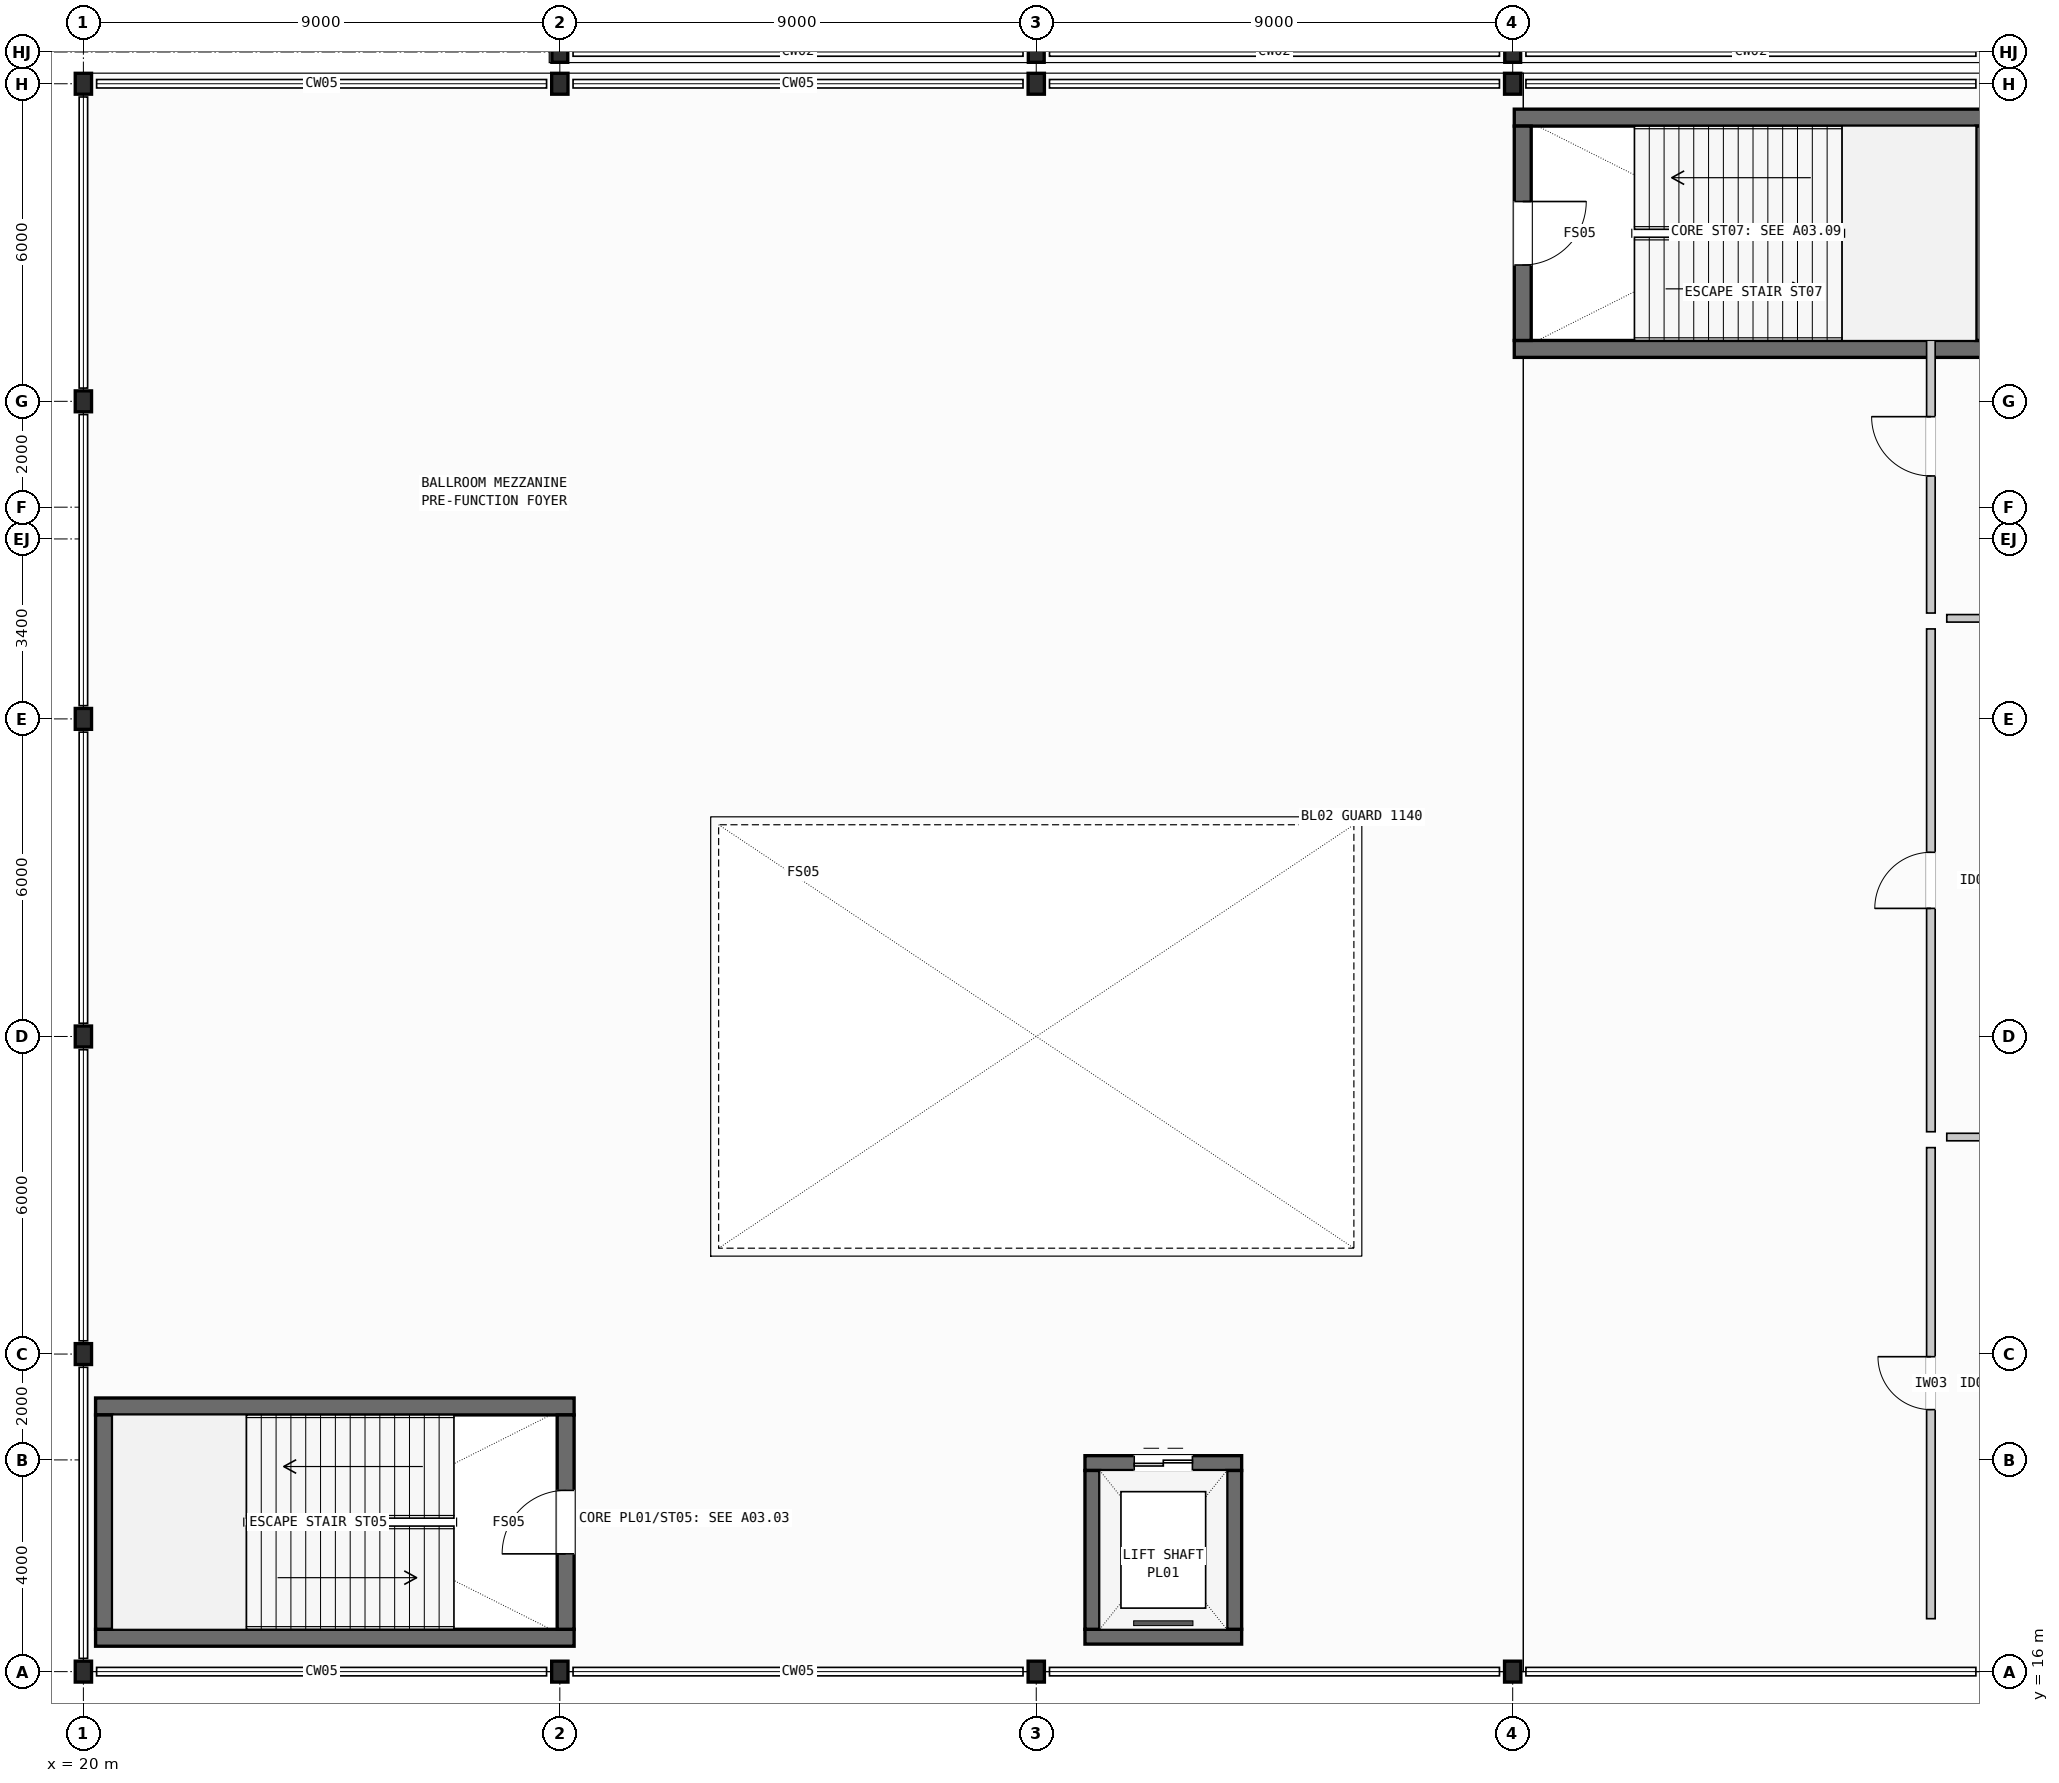
"""IFC4 building model, lengths in metres.
Left out: names, types, materials, properties, quantities, classifications, styles, units other than length and angle.
Written with IfcOpenShell. Run it as: python <this file> out.ifc"""

import sys

from ifc_helpers import new_model, si_unit, direction, frame, frame_2d, origin, origin_2d, place, context, subcontext, project, spatial, rectangle, i_section, extrude, element, fill, save


model = new_model("IFC4")
c1 = context("Model", 3, precision=1e-05, world=origin(), true_north=direction((0.0, 1.0)))
c2 = subcontext(c1, "Body", "Model", "MODEL_VIEW")
j1 = project(units=[si_unit("LENGTHUNIT", "METRE"), si_unit("PLANEANGLEUNIT", "RADIAN")], contexts=[c1])
p1 = place(None, origin())
s1 = spatial("IfcSite", under=j1, at=p1, CompositionType="ELEMENT")
p2 = place(p1, origin())
s2 = spatial("IfcBuilding", under=s1, at=p2, CompositionType="ELEMENT")
p3 = place(p2, frame((0.0, 0.0, 6.0)))
s3 = spatial("IfcBuildingStorey", under=s2, at=p3, CompositionType="ELEMENT", Elevation=6.0)
for number, where, z_axis, x_axis in (
    (1, (20.0, 16.0, 0.0), (0.0, 0.0, 1.0), (1.0, 0.0, 0.0)),
    (2, (20.0, 22.0, 0.0), (0.0, 0.0, 1.0), (1.0, 0.0, 0.0)),
    (3, (20.0, 28.0, 0.0), (0.0, 0.0, 1.0), (1.0, 0.0, 0.0)),
    (4, (20.0, 34.0, 0.0), (0.0, 0.0, 1.0), (1.0, 0.0, 0.0)),
    (5, (20.0, 40.0, 0.0), (0.0, 0.0, 1.0), (1.0, 0.0, 0.0)),
    (6, (20.0, 46.0, 0.0), (0.0, 0.0, 1.0), (1.0, 0.0, 0.0)),
    (7, (29.0, 16.0, 0.0), (0.0, 0.0, 1.0), (1.0, 0.0, 0.0)),
    (8, (29.0, 46.0, 0.0), (0.0, 0.0, 1.0), (1.0, 0.0, 0.0)),
):
    element("IfcColumn", number, at=place(p3, frame(where, z_axis=z_axis, x_axis=x_axis)), inside=s3, PredefinedType="COLUMN", context=c2, shape_type="SweptSolid", body=[
        extrude(i_section(OverallWidth=0.308, OverallDepth=0.395, WebThickness=0.021, FlangeThickness=0.04, FilletRadius=0.027, at=origin_2d()), origin(), (0.0, 0.0, 1.0), 5.4),
    ])
p4 = place(p3, frame((29.0, 46.6, 0.0), z_axis=(0.0, 0.0, 1.0), x_axis=(1.0, 0.0, 0.0)))
e9 = element("IfcColumn", 9, at=p4, inside=s3, PredefinedType="COLUMN", context=c2, shape_type="SweptSolid", body=[
    extrude(i_section(OverallWidth=0.3, OverallDepth=0.39, WebThickness=0.011, FlangeThickness=0.019, FilletRadius=0.027, at=origin_2d()), origin(), (0.0, 0.0, 1.0), 5.4),
])
for number, where, z_axis, x_axis in (
    (10, (38.0, 16.0, 0.0), (0.0, 0.0, 1.0), (1.0, 0.0, 0.0)),
    (11, (38.0, 46.0, 0.0), (0.0, 0.0, 1.0), (1.0, 0.0, 0.0)),
):
    element("IfcColumn", number, at=place(p3, frame(where, z_axis=z_axis, x_axis=x_axis)), inside=s3, PredefinedType="COLUMN", context=c2, shape_type="SweptSolid", body=[
        extrude(i_section(OverallWidth=0.308, OverallDepth=0.395, WebThickness=0.021, FlangeThickness=0.04, FilletRadius=0.027, at=origin_2d()), origin(), (0.0, 0.0, 1.0), 5.4),
    ])
p5 = place(p3, frame((38.0, 46.6, 0.0), z_axis=(0.0, 0.0, 1.0), x_axis=(1.0, 0.0, 0.0)))
e12 = element("IfcColumn", 12, at=p5, inside=s3, PredefinedType="COLUMN", context=c2, shape_type="SweptSolid", body=[
    extrude(i_section(OverallWidth=0.3, OverallDepth=0.39, WebThickness=0.011, FlangeThickness=0.019, FilletRadius=0.027, at=origin_2d()), origin(), (0.0, 0.0, 1.0), 5.4),
])
for number, where, z_axis, x_axis in (
    (13, (47.0, 16.0, 0.0), (0.0, 0.0, 1.0), (1.0, 0.0, 0.0)),
    (14, (47.0, 46.0, 0.0), (0.0, 0.0, 1.0), (1.0, 0.0, 0.0)),
):
    element("IfcColumn", number, at=place(p3, frame(where, z_axis=z_axis, x_axis=x_axis)), inside=s3, PredefinedType="COLUMN", context=c2, shape_type="SweptSolid", body=[
        extrude(i_section(OverallWidth=0.308, OverallDepth=0.395, WebThickness=0.021, FlangeThickness=0.04, FilletRadius=0.027, at=origin_2d()), origin(), (0.0, 0.0, 1.0), 5.4),
    ])
p6 = place(p3, frame((47.0, 46.6, 0.0), z_axis=(0.0, 0.0, 1.0), x_axis=(1.0, 0.0, 0.0)))
e15 = element("IfcColumn", 15, at=p6, inside=s3, PredefinedType="COLUMN", context=c2, shape_type="SweptSolid", body=[
    extrude(i_section(OverallWidth=0.3, OverallDepth=0.39, WebThickness=0.011, FlangeThickness=0.019, FilletRadius=0.027, at=origin_2d()), origin(), (0.0, 0.0, 1.0), 5.4),
])
for number, where, z_axis, x_axis in (
    (16, (20.23, 16.64, 0.0), (0.0, 0.0, 1.0), (1.0, 0.0, 0.0)),
    (17, (20.23, 21.01, 0.0), (0.0, 0.0, 1.0), (1.0, 0.0, 0.0)),
):
    element("IfcWall", number, at=place(p3, frame(where, z_axis=z_axis, x_axis=x_axis)), inside=s3, PredefinedType="SHEAR", context=c2, shape_type="SweptSolid", body=[
        extrude(rectangle(XDim=9.04, YDim=0.32, at=frame_2d((4.52, 0.0))), origin(), (0.0, 0.0, 1.0), 5.4),
    ])
p7 = place(p3, frame((20.39, 16.8, 0.0), z_axis=(0.0, 0.0, 1.0), x_axis=(0.0, 1.0, 0.0)))
e18 = element("IfcWall", 18, at=p7, inside=s3, PredefinedType="SHEAR", context=c2, shape_type="SweptSolid", body=[
    extrude(rectangle(XDim=4.05, YDim=0.32, at=frame_2d((2.025, 0.0))), origin(), (0.0, 0.0, 1.0), 5.4),
])
p8 = place(p3, frame((29.11, 16.8, 0.0), z_axis=(0.0, 0.0, 1.0), x_axis=(0.0, 1.0, 0.0)))
e19 = element("IfcWall", 19, at=p8, inside=s3, PredefinedType="SHEAR", context=c2, shape_type="SweptSolid", body=[
    extrude(rectangle(XDim=4.05, YDim=0.32, at=frame_2d((2.025, 0.0))), origin(), (0.0, 0.0, 1.0), 5.4),
])
p9 = place(p8, frame((1.425, 0.0, 0.0)))
e20 = element("IfcOpeningElement", 20, at=p9, cuts=e19, PredefinedType="OPENING", context=c2, shape_type="SweptSolid", body=[
    extrude(rectangle(XDim=1.2, YDim=2.2, at=frame_2d((0.6, 1.1))), frame((0.0, 0.17, 0.0), z_axis=(0.0, -1.0, 0.0), x_axis=(1.0, 0.0, 0.0)), (0.0, 0.0, 1.0), 0.34),
])
for number, where, z_axis, x_axis in (
    (21, (47.03, 40.99, 0.0), (0.0, 0.0, 1.0), (1.0, 0.0, 0.0)),
    (22, (47.03, 45.36, 0.0), (0.0, 0.0, 1.0), (1.0, 0.0, 0.0)),
):
    element("IfcWall", number, at=place(p3, frame(where, z_axis=z_axis, x_axis=x_axis)), inside=s3, PredefinedType="SHEAR", context=c2, shape_type="SweptSolid", body=[
        extrude(rectangle(XDim=9.04, YDim=0.32, at=frame_2d((4.52, 0.0))), origin(), (0.0, 0.0, 1.0), 5.4),
    ])
p10 = place(p3, frame((47.19, 41.15, 0.0), z_axis=(0.0, 0.0, 1.0), x_axis=(0.0, 1.0, 0.0)))
e23 = element("IfcWall", 23, at=p10, inside=s3, PredefinedType="SHEAR", context=c2, shape_type="SweptSolid", body=[
    extrude(rectangle(XDim=4.05, YDim=0.32, at=frame_2d((2.025, 0.0))), origin(), (0.0, 0.0, 1.0), 5.4),
])
p11 = place(p10, frame((1.425, 0.0, 0.0)))
e24 = element("IfcOpeningElement", 24, at=p11, cuts=e23, PredefinedType="OPENING", context=c2, shape_type="SweptSolid", body=[
    extrude(rectangle(XDim=1.2, YDim=2.2, at=frame_2d((0.6, 1.1))), frame((0.0, 0.17, 0.0), z_axis=(0.0, -1.0, 0.0), x_axis=(1.0, 0.0, 0.0)), (0.0, 0.0, 1.0), 0.34),
])
p12 = place(p3, frame((55.91, 41.15, 0.0), z_axis=(0.0, 0.0, 1.0), x_axis=(0.0, 1.0, 0.0)))
e25 = element("IfcWall", 25, at=p12, inside=s3, PredefinedType="SHEAR", context=c2, shape_type="SweptSolid", body=[
    extrude(rectangle(XDim=4.05, YDim=0.32, at=frame_2d((2.025, 0.0))), origin(), (0.0, 0.0, 1.0), 5.4),
])
p13 = place(p3, frame((38.92, 16.66, 0.0), z_axis=(0.0, 0.0, 1.0), x_axis=(1.0, 0.0, 0.0)))
e26 = element("IfcWall", 26, at=p13, inside=s3, PredefinedType="SHEAR", context=c2, shape_type="SweptSolid", body=[
    extrude(rectangle(XDim=2.96, YDim=0.28, at=frame_2d((1.48, 0.0))), origin(), (0.0, 0.0, 1.0), 5.4),
])
p14 = place(p3, frame((38.92, 19.94, 0.0), z_axis=(0.0, 0.0, 1.0), x_axis=(1.0, 0.0, 0.0)))
e27 = element("IfcWall", 27, at=p14, inside=s3, PredefinedType="SHEAR", context=c2, shape_type="SweptSolid", body=[
    extrude(rectangle(XDim=2.96, YDim=0.28, at=frame_2d((1.48, 0.0))), origin(), (0.0, 0.0, 1.0), 5.4),
])
p15 = place(p14, frame((0.93, 0.0, 0.0)))
e28 = element("IfcOpeningElement", 28, at=p15, cuts=e27, PredefinedType="OPENING", context=c2, shape_type="SweptSolid", body=[
    extrude(rectangle(XDim=1.1, YDim=2.15, at=frame_2d((0.55, 1.075))), frame((0.0, 0.15, 0.0), z_axis=(0.0, -1.0, 0.0), x_axis=(1.0, 0.0, 0.0)), (0.0, 0.0, 1.0), 0.3),
])
for number, where, z_axis, x_axis in (
    (29, (39.06, 16.8, 0.0), (0.0, 0.0, 1.0), (0.0, 1.0, 0.0)),
    (30, (41.74, 16.8, 0.0), (0.0, 0.0, 1.0), (0.0, 1.0, 0.0)),
):
    element("IfcWall", number, at=place(p3, frame(where, z_axis=z_axis, x_axis=x_axis)), inside=s3, PredefinedType="SHEAR", context=c2, shape_type="SweptSolid", body=[
        extrude(rectangle(XDim=3.0, YDim=0.28, at=frame_2d((1.5, 0.0))), origin(), (0.0, 0.0, 1.0), 5.4),
    ])
p16 = place(p3, frame((54.9, 17.0, 0.0), z_axis=(0.0, 0.0, 1.0), x_axis=(0.0, 1.0, 0.0)))
e31 = element("IfcWall", 31, at=p16, inside=s3, PredefinedType="PARTITIONING", context=c2, shape_type="SweptSolid", body=[
    extrude(rectangle(XDim=8.9, YDim=0.162, at=frame_2d((4.45, 0.0))), origin(), (0.0, 0.0, 1.0), 4.4),
])
p17 = place(p16, frame((3.95, 0.0, 0.0)))
e32 = element("IfcOpeningElement", 32, at=p17, cuts=e31, PredefinedType="OPENING", context=c2, shape_type="SweptSolid", body=[
    extrude(rectangle(XDim=1.0, YDim=2.15, at=frame_2d((0.5, 1.075))), frame((0.0, 0.091, 0.0), z_axis=(0.0, -1.0, 0.0), x_axis=(1.0, 0.0, 0.0)), (0.0, 0.0, 1.0), 0.182),
])
p18 = place(p3, frame((54.9, 26.2, 0.0), z_axis=(0.0, 0.0, 1.0), x_axis=(0.0, 1.0, 0.0)))
e33 = element("IfcWall", 33, at=p18, inside=s3, PredefinedType="PARTITIONING", context=c2, shape_type="SweptSolid", body=[
    extrude(rectangle(XDim=9.5, YDim=0.162, at=frame_2d((4.75, 0.0))), origin(), (0.0, 0.0, 1.0), 4.4),
])
p19 = place(p18, frame((4.22, 0.0, 0.0)))
e34 = element("IfcOpeningElement", 34, at=p19, cuts=e33, PredefinedType="OPENING", context=c2, shape_type="SweptSolid", body=[
    extrude(rectangle(XDim=1.06, YDim=2.18, at=frame_2d((0.53, 1.09))), frame((0.0, 0.091, 0.0), z_axis=(0.0, -1.0, 0.0), x_axis=(1.0, 0.0, 0.0)), (0.0, 0.0, 1.0), 0.182),
])
p20 = place(p3, frame((54.9, 36.0, 0.0), z_axis=(0.0, 0.0, 1.0), x_axis=(0.0, 1.0, 0.0)))
e35 = element("IfcWall", 35, at=p20, inside=s3, PredefinedType="PARTITIONING", context=c2, shape_type="SweptSolid", body=[
    extrude(rectangle(XDim=8.8, YDim=0.162, at=frame_2d((4.4, 0.0))), origin(), (0.0, 0.0, 1.0), 4.4),
])
p21 = place(p20, frame((2.59, 0.0, 0.0)))
e36 = element("IfcOpeningElement", 36, at=p21, cuts=e35, PredefinedType="OPENING", context=c2, shape_type="SweptSolid", body=[
    extrude(rectangle(XDim=1.12, YDim=2.22, at=frame_2d((0.56, 1.11))), frame((0.0, 0.091, 0.0), z_axis=(0.0, -1.0, 0.0), x_axis=(1.0, 0.0, 0.0)), (0.0, 0.0, 1.0), 0.182),
])
for number, where, z_axis, x_axis in (
    (37, (55.2, 26.1, 0.0), (0.0, 0.0, 1.0), (1.0, 0.0, 0.0)),
    (38, (55.2, 35.9, 0.0), (0.0, 0.0, 1.0), (1.0, 0.0, 0.0)),
):
    element("IfcWall", number, at=place(p3, frame(where, z_axis=z_axis, x_axis=x_axis)), inside=s3, PredefinedType="MOVABLE", context=c2, shape_type="SweptSolid", body=[
        extrude(rectangle(XDim=27.0, YDim=0.142, at=frame_2d((13.5, 0.0))), origin(), (0.0, 0.0, 1.0), 2.65),
    ])
p22 = place(p9, origin())
e39 = element("IfcDoor", 39, at=p22, inside=s3, OperationType="SINGLE_SWING_LEFT", PredefinedType="DOOR", context=c2, shape_type="SweptSolid", body=[
    extrude(rectangle(XDim=1.2, YDim=2.2, at=frame_2d((0.6, 1.1))), frame((0.0, 0.025, 0.0), z_axis=(0.0, -1.0, 0.0), x_axis=(1.0, 0.0, 0.0)), (0.0, 0.0, 1.0), 0.05),
])
fill(e20, e39)
p23 = place(p11, frame((1.2, 0.0, 0.0), z_axis=(0.0, 0.0, 1.0), x_axis=(-1.0, 0.0, 0.0)))
e40 = element("IfcDoor", 40, at=p23, inside=s3, OperationType="SINGLE_SWING_LEFT", PredefinedType="DOOR", context=c2, shape_type="SweptSolid", body=[
    extrude(rectangle(XDim=1.2, YDim=2.2, at=frame_2d((0.6, 1.1))), frame((0.0, 0.025, 0.0), z_axis=(0.0, -1.0, 0.0), x_axis=(1.0, 0.0, 0.0)), (0.0, 0.0, 1.0), 0.05),
])
fill(e24, e40)
p24 = place(p15, origin())
e41 = element("IfcDoor", 41, at=p24, inside=s3, OperationType="DOUBLE_DOOR_SLIDING", PredefinedType="DOOR", context=c2, shape_type="SweptSolid", body=[
    extrude(rectangle(XDim=1.1, YDim=2.15, at=frame_2d((0.55, 1.075))), frame((0.0, 0.025, 0.0), z_axis=(0.0, -1.0, 0.0), x_axis=(1.0, 0.0, 0.0)), (0.0, 0.0, 1.0), 0.05),
])
fill(e28, e41)
p25 = place(p17, origin())
e42 = element("IfcDoor", 42, at=p25, inside=s3, OperationType="SINGLE_SWING_RIGHT", PredefinedType="DOOR", context=c2, shape_type="SweptSolid", body=[
    extrude(rectangle(XDim=1.0, YDim=2.15, at=frame_2d((0.5, 1.075))), frame((0.0, 0.025, 0.0), z_axis=(0.0, -1.0, 0.0), x_axis=(1.0, 0.0, 0.0)), (0.0, 0.0, 1.0), 0.05),
])
fill(e32, e42)
p26 = place(p19, origin())
e43 = element("IfcDoor", 43, at=p26, inside=s3, OperationType="SINGLE_SWING_LEFT", PredefinedType="DOOR", context=c2, shape_type="SweptSolid", body=[
    extrude(rectangle(XDim=1.06, YDim=2.18, at=frame_2d((0.53, 1.09))), frame((0.0, 0.025, 0.0), z_axis=(0.0, -1.0, 0.0), x_axis=(1.0, 0.0, 0.0)), (0.0, 0.0, 1.0), 0.05),
])
fill(e34, e43)
p27 = place(p21, origin())
e44 = element("IfcDoor", 44, at=p27, inside=s3, OperationType="SINGLE_SWING_RIGHT", PredefinedType="DOOR", context=c2, shape_type="SweptSolid", body=[
    extrude(rectangle(XDim=1.12, YDim=2.22, at=frame_2d((0.56, 1.11))), frame((0.0, 0.025, 0.0), z_axis=(0.0, -1.0, 0.0), x_axis=(1.0, 0.0, 0.0)), (0.0, 0.0, 1.0), 0.05),
])
fill(e36, e44)
save(model, sys.argv[1])
